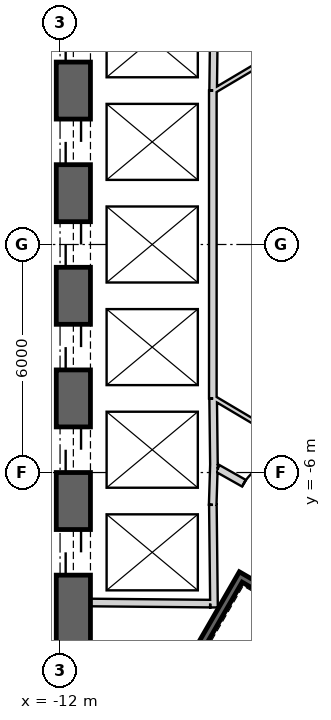
"""IFC4 building model, lengths in metres.
Left out: names, types, materials, properties, quantities, classifications, styles, units other than length and angle.
Written with IfcOpenShell. Run it as: python <this file> out.ifc"""

import sys

from ifc_helpers import new_model, si_unit, direction, frame, frame_2d, origin, place, context, subcontext, project, spatial, rectangle, extrude, element, fill, save


model = new_model("IFC4")
c1 = context("Model", 3, precision=1e-05, world=origin(), true_north=direction((0.0, 1.0)))
c2 = subcontext(c1, "Body", "Model", "MODEL_VIEW")
j1 = project(units=[si_unit("LENGTHUNIT", "METRE"), si_unit("PLANEANGLEUNIT", "RADIAN")], contexts=[c1])
p1 = place(None, origin())
s1 = spatial("IfcSite", under=j1, at=p1, CompositionType="ELEMENT")
p2 = place(p1, origin())
s2 = spatial("IfcBuilding", under=s1, at=p2, CompositionType="ELEMENT")
p3 = place(p2, frame((0.0, 0.0, 94.7)))
s3 = spatial("IfcBuildingStorey", under=s2, at=p3, CompositionType="ELEMENT", Elevation=94.7)
p4 = place(p3, frame((19.475, 2.208, 0.0), z_axis=(0.0, 0.0, 1.0), x_axis=(-0.866028369851, 0.499994862586, 0.0)))
e1 = element("IfcWall", 1, at=p4, inside=s3, PredefinedType="SHEAR", context=c2, shape_type="SweptSolid", body=[
    extrude(rectangle(XDim=31.523, YDim=0.9, at=frame_2d((15.762, 0.0))), origin(), (0.0, 0.0, 1.0), 4.1),
])
p5 = place(p4, frame((7.062, 0.0, 0.0)))
e2 = element("IfcOpeningElement", 2, at=p5, cuts=e1, PredefinedType="OPENING", context=c2, shape_type="SweptSolid", body=[
    extrude(rectangle(XDim=1.2, YDim=2.4, at=frame_2d((0.6, 1.2))), frame((0.0, 0.46, 0.0), z_axis=(0.0, -1.0, 0.0), x_axis=(1.0, 0.0, 0.0)), (0.0, 0.0, 1.0), 0.92),
])
p6 = place(p4, frame((9.762, 0.0, 0.0)))
e3 = element("IfcOpeningElement", 3, at=p6, cuts=e1, PredefinedType="OPENING", context=c2, shape_type="SweptSolid", body=[
    extrude(rectangle(XDim=1.2, YDim=2.4, at=frame_2d((0.6, 1.2))), frame((0.0, 0.46, 0.0), z_axis=(0.0, -1.0, 0.0), x_axis=(1.0, 0.0, 0.0)), (0.0, 0.0, 1.0), 0.92),
])
p7 = place(p4, frame((12.462, 0.0, 0.0)))
e4 = element("IfcOpeningElement", 4, at=p7, cuts=e1, PredefinedType="OPENING", context=c2, shape_type="SweptSolid", body=[
    extrude(rectangle(XDim=1.2, YDim=2.4, at=frame_2d((0.6, 1.2))), frame((0.0, 0.46, 0.0), z_axis=(0.0, -1.0, 0.0), x_axis=(1.0, 0.0, 0.0)), (0.0, 0.0, 1.0), 0.92),
])
p8 = place(p4, frame((15.162, 0.0, 0.0)))
e5 = element("IfcOpeningElement", 5, at=p8, cuts=e1, PredefinedType="OPENING", context=c2, shape_type="SweptSolid", body=[
    extrude(rectangle(XDim=1.2, YDim=2.4, at=frame_2d((0.6, 1.2))), frame((0.0, 0.46, 0.0), z_axis=(0.0, -1.0, 0.0), x_axis=(1.0, 0.0, 0.0)), (0.0, 0.0, 1.0), 0.92),
])
p9 = place(p4, frame((17.862, 0.0, 0.0)))
e6 = element("IfcOpeningElement", 6, at=p9, cuts=e1, PredefinedType="OPENING", context=c2, shape_type="SweptSolid", body=[
    extrude(rectangle(XDim=1.2, YDim=2.4, at=frame_2d((0.6, 1.2))), frame((0.0, 0.46, 0.0), z_axis=(0.0, -1.0, 0.0), x_axis=(1.0, 0.0, 0.0)), (0.0, 0.0, 1.0), 0.92),
])
p10 = place(p4, frame((20.562, 0.0, 0.0)))
e7 = element("IfcOpeningElement", 7, at=p10, cuts=e1, PredefinedType="OPENING", context=c2, shape_type="SweptSolid", body=[
    extrude(rectangle(XDim=1.2, YDim=2.4, at=frame_2d((0.6, 1.2))), frame((0.0, 0.46, 0.0), z_axis=(0.0, -1.0, 0.0), x_axis=(1.0, 0.0, 0.0)), (0.0, 0.0, 1.0), 0.92),
])
p11 = place(p4, frame((23.262, 0.0, 0.0)))
e8 = element("IfcOpeningElement", 8, at=p11, cuts=e1, PredefinedType="OPENING", context=c2, shape_type="SweptSolid", body=[
    extrude(rectangle(XDim=1.2, YDim=2.4, at=frame_2d((0.6, 1.2))), frame((0.0, 0.46, 0.0), z_axis=(0.0, -1.0, 0.0), x_axis=(1.0, 0.0, 0.0)), (0.0, 0.0, 1.0), 0.92),
])
p12 = place(p4, frame((3.612, 0.0, 0.0)))
e9 = element("IfcOpeningElement", 9, at=p12, cuts=e1, PredefinedType="OPENING", context=c2, shape_type="SweptSolid", body=[
    extrude(rectangle(XDim=1.2, YDim=2.4, at=frame_2d((0.6, 1.2))), frame((0.0, 0.46, 0.0), z_axis=(0.0, -1.0, 0.0), x_axis=(1.0, 0.0, 0.0)), (0.0, 0.0, 1.0), 0.92),
])
p13 = place(p4, frame((26.712, 0.0, 0.0)))
e10 = element("IfcOpeningElement", 10, at=p13, cuts=e1, PredefinedType="OPENING", context=c2, shape_type="SweptSolid", body=[
    extrude(rectangle(XDim=1.2, YDim=2.4, at=frame_2d((0.6, 1.2))), frame((0.0, 0.46, 0.0), z_axis=(0.0, -1.0, 0.0), x_axis=(1.0, 0.0, 0.0)), (0.0, 0.0, 1.0), 0.92),
])
p14 = place(p3, frame((-11.65, 15.762, 0.0), z_axis=(0.0, 0.0, 1.0), x_axis=(0.0, -1.0, 0.0)))
e11 = element("IfcWall", 11, at=p14, inside=s3, PredefinedType="SHEAR", context=c2, shape_type="SweptSolid", body=[
    extrude(rectangle(XDim=31.523, YDim=0.9, at=frame_2d((15.762, 0.0))), origin(), (0.0, 0.0, 1.0), 4.1),
])
p15 = place(p14, frame((7.062, 0.0, 0.0)))
e12 = element("IfcOpeningElement", 12, at=p15, cuts=e11, PredefinedType="OPENING", context=c2, shape_type="SweptSolid", body=[
    extrude(rectangle(XDim=1.2, YDim=2.4, at=frame_2d((0.6, 1.2))), frame((0.0, 0.46, 0.0), z_axis=(0.0, -1.0, 0.0), x_axis=(1.0, 0.0, 0.0)), (0.0, 0.0, 1.0), 0.92),
])
p16 = place(p14, frame((9.762, 0.0, 0.0)))
e13 = element("IfcOpeningElement", 13, at=p16, cuts=e11, PredefinedType="OPENING", context=c2, shape_type="SweptSolid", body=[
    extrude(rectangle(XDim=1.2, YDim=2.4, at=frame_2d((0.6, 1.2))), frame((0.0, 0.46, 0.0), z_axis=(0.0, -1.0, 0.0), x_axis=(1.0, 0.0, 0.0)), (0.0, 0.0, 1.0), 0.92),
])
p17 = place(p14, frame((12.462, 0.0, 0.0)))
e14 = element("IfcOpeningElement", 14, at=p17, cuts=e11, PredefinedType="OPENING", context=c2, shape_type="SweptSolid", body=[
    extrude(rectangle(XDim=1.2, YDim=2.4, at=frame_2d((0.6, 1.2))), frame((0.0, 0.46, 0.0), z_axis=(0.0, -1.0, 0.0), x_axis=(1.0, 0.0, 0.0)), (0.0, 0.0, 1.0), 0.92),
])
p18 = place(p14, frame((15.162, 0.0, 0.0)))
e15 = element("IfcOpeningElement", 15, at=p18, cuts=e11, PredefinedType="OPENING", context=c2, shape_type="SweptSolid", body=[
    extrude(rectangle(XDim=1.2, YDim=2.4, at=frame_2d((0.6, 1.2))), frame((0.0, 0.46, 0.0), z_axis=(0.0, -1.0, 0.0), x_axis=(1.0, 0.0, 0.0)), (0.0, 0.0, 1.0), 0.92),
])
p19 = place(p14, frame((17.862, 0.0, 0.0)))
e16 = element("IfcOpeningElement", 16, at=p19, cuts=e11, PredefinedType="OPENING", context=c2, shape_type="SweptSolid", body=[
    extrude(rectangle(XDim=1.2, YDim=2.4, at=frame_2d((0.6, 1.2))), frame((0.0, 0.46, 0.0), z_axis=(0.0, -1.0, 0.0), x_axis=(1.0, 0.0, 0.0)), (0.0, 0.0, 1.0), 0.92),
])
p20 = place(p14, frame((20.562, 0.0, 0.0)))
e17 = element("IfcOpeningElement", 17, at=p20, cuts=e11, PredefinedType="OPENING", context=c2, shape_type="SweptSolid", body=[
    extrude(rectangle(XDim=1.2, YDim=2.4, at=frame_2d((0.6, 1.2))), frame((0.0, 0.46, 0.0), z_axis=(0.0, -1.0, 0.0), x_axis=(1.0, 0.0, 0.0)), (0.0, 0.0, 1.0), 0.92),
])
p21 = place(p14, frame((23.262, 0.0, 0.0)))
e18 = element("IfcOpeningElement", 18, at=p21, cuts=e11, PredefinedType="OPENING", context=c2, shape_type="SweptSolid", body=[
    extrude(rectangle(XDim=1.2, YDim=2.4, at=frame_2d((0.6, 1.2))), frame((0.0, 0.46, 0.0), z_axis=(0.0, -1.0, 0.0), x_axis=(1.0, 0.0, 0.0)), (0.0, 0.0, 1.0), 0.92),
])
p22 = place(p14, frame((3.612, 0.0, 0.0)))
e19 = element("IfcOpeningElement", 19, at=p22, cuts=e11, PredefinedType="OPENING", context=c2, shape_type="SweptSolid", body=[
    extrude(rectangle(XDim=1.2, YDim=2.4, at=frame_2d((0.6, 1.2))), frame((0.0, 0.46, 0.0), z_axis=(0.0, -1.0, 0.0), x_axis=(1.0, 0.0, 0.0)), (0.0, 0.0, 1.0), 0.92),
])
p23 = place(p14, frame((26.712, 0.0, 0.0)))
e20 = element("IfcOpeningElement", 20, at=p23, cuts=e11, PredefinedType="OPENING", context=c2, shape_type="SweptSolid", body=[
    extrude(rectangle(XDim=1.2, YDim=2.4, at=frame_2d((0.6, 1.2))), frame((0.0, 0.46, 0.0), z_axis=(0.0, -1.0, 0.0), x_axis=(1.0, 0.0, 0.0)), (0.0, 0.0, 1.0), 0.92),
])
p24 = place(p3, frame((-7.825, -17.97, 0.0), z_axis=(0.0, 0.0, 1.0), x_axis=(0.866028369851, 0.499994862586, 0.0)))
e21 = element("IfcWall", 21, at=p24, inside=s3, PredefinedType="SHEAR", context=c2, shape_type="SweptSolid", body=[
    extrude(rectangle(XDim=31.523, YDim=0.9, at=frame_2d((15.762, 0.0))), origin(), (0.0, 0.0, 1.0), 4.1),
])
p25 = place(p24, frame((7.062, 0.0, 0.0)))
e22 = element("IfcOpeningElement", 22, at=p25, cuts=e21, PredefinedType="OPENING", context=c2, shape_type="SweptSolid", body=[
    extrude(rectangle(XDim=1.2, YDim=2.4, at=frame_2d((0.6, 1.2))), frame((0.0, 0.46, 0.0), z_axis=(0.0, -1.0, 0.0), x_axis=(1.0, 0.0, 0.0)), (0.0, 0.0, 1.0), 0.92),
])
p26 = place(p24, frame((9.762, 0.0, 0.0)))
e23 = element("IfcOpeningElement", 23, at=p26, cuts=e21, PredefinedType="OPENING", context=c2, shape_type="SweptSolid", body=[
    extrude(rectangle(XDim=1.2, YDim=2.4, at=frame_2d((0.6, 1.2))), frame((0.0, 0.46, 0.0), z_axis=(0.0, -1.0, 0.0), x_axis=(1.0, 0.0, 0.0)), (0.0, 0.0, 1.0), 0.92),
])
p27 = place(p24, frame((12.462, 0.0, 0.0)))
e24 = element("IfcOpeningElement", 24, at=p27, cuts=e21, PredefinedType="OPENING", context=c2, shape_type="SweptSolid", body=[
    extrude(rectangle(XDim=1.2, YDim=2.4, at=frame_2d((0.6, 1.2))), frame((0.0, 0.46, 0.0), z_axis=(0.0, -1.0, 0.0), x_axis=(1.0, 0.0, 0.0)), (0.0, 0.0, 1.0), 0.92),
])
p28 = place(p24, frame((15.162, 0.0, 0.0)))
e25 = element("IfcOpeningElement", 25, at=p28, cuts=e21, PredefinedType="OPENING", context=c2, shape_type="SweptSolid", body=[
    extrude(rectangle(XDim=1.2, YDim=2.4, at=frame_2d((0.6, 1.2))), frame((0.0, 0.46, 0.0), z_axis=(0.0, -1.0, 0.0), x_axis=(1.0, 0.0, 0.0)), (0.0, 0.0, 1.0), 0.92),
])
p29 = place(p24, frame((17.862, 0.0, 0.0)))
e26 = element("IfcOpeningElement", 26, at=p29, cuts=e21, PredefinedType="OPENING", context=c2, shape_type="SweptSolid", body=[
    extrude(rectangle(XDim=1.2, YDim=2.4, at=frame_2d((0.6, 1.2))), frame((0.0, 0.46, 0.0), z_axis=(0.0, -1.0, 0.0), x_axis=(1.0, 0.0, 0.0)), (0.0, 0.0, 1.0), 0.92),
])
p30 = place(p24, frame((20.562, 0.0, 0.0)))
e27 = element("IfcOpeningElement", 27, at=p30, cuts=e21, PredefinedType="OPENING", context=c2, shape_type="SweptSolid", body=[
    extrude(rectangle(XDim=1.2, YDim=2.4, at=frame_2d((0.6, 1.2))), frame((0.0, 0.46, 0.0), z_axis=(0.0, -1.0, 0.0), x_axis=(1.0, 0.0, 0.0)), (0.0, 0.0, 1.0), 0.92),
])
p31 = place(p24, frame((26.712, 0.0, 0.0)))
e28 = element("IfcOpeningElement", 28, at=p31, cuts=e21, PredefinedType="OPENING", context=c2, shape_type="SweptSolid", body=[
    extrude(rectangle(XDim=1.2, YDim=2.4, at=frame_2d((0.6, 1.2))), frame((0.0, 0.46, 0.0), z_axis=(0.0, -1.0, 0.0), x_axis=(1.0, 0.0, 0.0)), (0.0, 0.0, 1.0), 0.92),
])
p32 = place(p24, frame((3.612, 0.0, 0.0)))
e29 = element("IfcOpeningElement", 29, at=p32, cuts=e21, PredefinedType="OPENING", context=c2, shape_type="SweptSolid", body=[
    extrude(rectangle(XDim=1.2, YDim=2.4, at=frame_2d((0.6, 1.2))), frame((0.0, 0.46, 0.0), z_axis=(0.0, -1.0, 0.0), x_axis=(1.0, 0.0, 0.0)), (0.0, 0.0, 1.0), 0.92),
])
p33 = place(p3, frame((-7.949, 5.895, 0.0), z_axis=(0.0, 0.0, 1.0), x_axis=(-0.012042535896, -0.999927486035, 0.0)))
e30 = element("IfcWall", 30, at=p33, inside=s3, PredefinedType="PLUMBINGWALL", context=c2, shape_type="SweptSolid", body=[
    extrude(rectangle(XDim=1.845, YDim=0.2, at=frame_2d((0.922, 0.0))), origin(), (0.0, 0.0, 1.0), 3.8),
])
p34 = place(p3, frame((-7.98, 4.05, 0.0), z_axis=(0.0, 0.0, 1.0), x_axis=(0.0, -1.0, 0.0)))
e31 = element("IfcWall", 31, at=p34, inside=s3, PredefinedType="PLUMBINGWALL", context=c2, shape_type="SweptSolid", body=[
    extrude(rectangle(XDim=8.1, YDim=0.2, at=frame_2d((4.05, 0.0))), origin(), (0.0, 0.0, 1.0), 3.8),
])
p35 = place(p3, frame((-7.95, -5.772, 0.0), z_axis=(0.0, 0.0, 1.0), x_axis=(-0.030803413295, -0.999525462272, 0.0)))
e32 = element("IfcWall", 32, at=p35, inside=s3, PredefinedType="PLUMBINGWALL", context=c2, shape_type="SweptSolid", body=[
    extrude(rectangle(XDim=1.078, YDim=0.2, at=frame_2d((0.539, 0.0))), origin(), (0.0, 0.0, 1.0), 3.8),
])
p36 = place(p3, frame((-7.971, -4.05, 0.0), z_axis=(0.0, 0.0, 1.0), x_axis=(0.012042535896, -0.999927486035, 0.0)))
e33 = element("IfcWall", 33, at=p36, inside=s3, PredefinedType="PLUMBINGWALL", context=c2, shape_type="SweptSolid", body=[
    extrude(rectangle(XDim=1.845, YDim=0.2, at=frame_2d((0.922, 0.0))), origin(), (0.0, 0.0, 1.0), 3.8),
])
p37 = place(p3, frame((-7.979, -6.85, 0.0), z_axis=(0.0, 0.0, 1.0), x_axis=(0.011121475088, -0.999938154483, 0.0)))
e34 = element("IfcWall", 34, at=p37, inside=s3, PredefinedType="PLUMBINGWALL", context=c2, shape_type="SweptSolid", body=[
    extrude(rectangle(XDim=2.7, YDim=0.2, at=frame_2d((1.35, 0.0))), origin(), (0.0, 0.0, 1.0), 3.8),
])
p38 = place(p3, frame((-8.05, -9.449, 0.0), z_axis=(0.0, 0.0, 1.0), x_axis=(-0.999957467379, 0.009222983926, 0.0)))
e35 = element("IfcWall", 35, at=p38, inside=s3, PredefinedType="PLUMBINGWALL", context=c2, shape_type="SweptSolid", body=[
    extrude(rectangle(XDim=3.15, YDim=0.2, at=frame_2d((1.575, 0.0))), origin(), (0.0, 0.0, 1.0), 3.8),
])
p39 = place(p3, frame((-7.196, -8.663, -0.3), z_axis=(0.0, 0.0, 1.0), x_axis=(-0.499997992926, -0.866026562566, 0.0)))
e36 = element("IfcWall", 36, at=p39, inside=s3, PredefinedType="SHEAR", context=c2, shape_type="SweptSolid", body=[
    extrude(rectangle(XDim=7.9, YDim=0.2, at=frame_2d((3.95, 0.0))), origin(), (0.0, 0.0, 1.0), 4.1),
])
p40 = place(p3, frame((-4.041, -10.599, -0.3), z_axis=(0.0, 0.0, 1.0), x_axis=(-0.866047807691, 0.499961193289, 0.0)))
e37 = element("IfcWall", 37, at=p40, inside=s3, PredefinedType="SHEAR", context=c2, shape_type="SweptSolid", body=[
    extrude(rectangle(XDim=3.6, YDim=0.2, at=frame_2d((1.8, 0.0))), origin(), (0.0, 0.0, 1.0), 4.1),
])
p41 = place(p40, frame((1.25, 0.0, 0.3)))
e38 = element("IfcOpeningElement", 38, at=p41, cuts=e37, PredefinedType="OPENING", context=c2, shape_type="SweptSolid", body=[
    extrude(rectangle(XDim=1.1, YDim=2.1, at=frame_2d((0.55, 1.05))), frame((0.0, 0.11, 0.0), z_axis=(0.0, -1.0, 0.0), x_axis=(1.0, 0.0, 0.0)), (0.0, 0.0, 1.0), 0.22),
])
p42 = place(p3, frame((-7.849, -5.894, 0.0), z_axis=(0.0, 0.0, 1.0), x_axis=(0.871363259478, -0.490638431059, 0.0)))
e39 = element("IfcWall", 39, at=p42, inside=s3, PredefinedType="PARTITIONING", context=c2, shape_type="SweptSolid", body=[
    extrude(rectangle(XDim=2.581, YDim=0.2, at=frame_2d((1.291, 0.0))), origin(), (0.0, 0.0, 1.0), 3.8),
])
p43 = place(p42, frame((0.791, 0.0, 0.0)))
e40 = element("IfcOpeningElement", 40, at=p43, cuts=e39, PredefinedType="OPENING", context=c2, shape_type="SweptSolid", body=[
    extrude(rectangle(XDim=1.0, YDim=2.1, at=frame_2d((0.5, 1.05))), frame((0.0, 0.11, 0.0), z_axis=(0.0, -1.0, 0.0), x_axis=(1.0, 0.0, 0.0)), (0.0, 0.0, 1.0), 0.22),
])
p44 = place(p3, frame((-7.95, -4.041, 0.0), z_axis=(0.0, 0.0, 1.0), x_axis=(0.860112457103, -0.510104461004, 0.0)))
e41 = element("IfcWall", 41, at=p44, inside=s3, PredefinedType="PARTITIONING", context=c2, shape_type="SweptSolid", body=[
    extrude(rectangle(XDim=2.104, YDim=0.12, at=frame_2d((1.052, 0.0))), origin(), (0.0, 0.0, 1.0), 3.8),
])
p45 = place(p3, frame((-6.037, 5.176, 0.0), z_axis=(0.0, 0.0, 1.0), x_axis=(-0.860106072674, -0.510115225953, 0.0)))
e42 = element("IfcWall", 42, at=p45, inside=s3, PredefinedType="PARTITIONING", context=c2, shape_type="SweptSolid", body=[
    extrude(rectangle(XDim=2.225, YDim=0.12, at=frame_2d((1.112, 0.0))), origin(), (0.0, 0.0, 1.0), 3.8),
])
p46 = place(p43, origin())
e43 = element("IfcDoor", 43, at=p46, inside=s3, OperationType="SINGLE_SWING_LEFT", PredefinedType="USERDEFINED", context=c2, shape_type="SweptSolid", body=[
    extrude(rectangle(XDim=1.0, YDim=2.1, at=frame_2d((0.5, 1.05))), frame((0.0, 0.025, 0.0), z_axis=(0.0, -1.0, 0.0), x_axis=(1.0, 0.0, 0.0)), (0.0, 0.0, 1.0), 0.05),
])
fill(e40, e43)
p47 = place(p16, origin())
e44 = element("IfcDoor", 44, at=p47, inside=s3, OperationType="SLIDING_TO_LEFT", PredefinedType="USERDEFINED", context=c2, shape_type="SweptSolid", body=[
    extrude(rectangle(XDim=1.2, YDim=2.4, at=frame_2d((0.6, 1.2))), frame((0.0, 0.025, 0.0), z_axis=(0.0, -1.0, 0.0), x_axis=(1.0, 0.0, 0.0)), (0.0, 0.0, 1.0), 0.05),
])
fill(e13, e44)
p48 = place(p17, origin())
e45 = element("IfcDoor", 45, at=p48, inside=s3, OperationType="SLIDING_TO_LEFT", PredefinedType="USERDEFINED", context=c2, shape_type="SweptSolid", body=[
    extrude(rectangle(XDim=1.2, YDim=2.4, at=frame_2d((0.6, 1.2))), frame((0.0, 0.025, 0.0), z_axis=(0.0, -1.0, 0.0), x_axis=(1.0, 0.0, 0.0)), (0.0, 0.0, 1.0), 0.05),
])
fill(e14, e45)
p49 = place(p18, origin())
e46 = element("IfcDoor", 46, at=p49, inside=s3, OperationType="SLIDING_TO_LEFT", PredefinedType="USERDEFINED", context=c2, shape_type="SweptSolid", body=[
    extrude(rectangle(XDim=1.2, YDim=2.4, at=frame_2d((0.6, 1.2))), frame((0.0, 0.025, 0.0), z_axis=(0.0, -1.0, 0.0), x_axis=(1.0, 0.0, 0.0)), (0.0, 0.0, 1.0), 0.05),
])
fill(e15, e46)
p50 = place(p19, origin())
e47 = element("IfcDoor", 47, at=p50, inside=s3, OperationType="SLIDING_TO_LEFT", PredefinedType="USERDEFINED", context=c2, shape_type="SweptSolid", body=[
    extrude(rectangle(XDim=1.2, YDim=2.4, at=frame_2d((0.6, 1.2))), frame((0.0, 0.025, 0.0), z_axis=(0.0, -1.0, 0.0), x_axis=(1.0, 0.0, 0.0)), (0.0, 0.0, 1.0), 0.05),
])
fill(e16, e47)
p51 = place(p20, origin())
e48 = element("IfcDoor", 48, at=p51, inside=s3, OperationType="SLIDING_TO_LEFT", PredefinedType="USERDEFINED", context=c2, shape_type="SweptSolid", body=[
    extrude(rectangle(XDim=1.2, YDim=2.4, at=frame_2d((0.6, 1.2))), frame((0.0, 0.025, 0.0), z_axis=(0.0, -1.0, 0.0), x_axis=(1.0, 0.0, 0.0)), (0.0, 0.0, 1.0), 0.05),
])
fill(e17, e48)
p52 = place(p21, origin())
e49 = element("IfcDoor", 49, at=p52, inside=s3, OperationType="SLIDING_TO_LEFT", PredefinedType="USERDEFINED", context=c2, shape_type="SweptSolid", body=[
    extrude(rectangle(XDim=1.2, YDim=2.4, at=frame_2d((0.6, 1.2))), frame((0.0, 0.025, 0.0), z_axis=(0.0, -1.0, 0.0), x_axis=(1.0, 0.0, 0.0)), (0.0, 0.0, 1.0), 0.05),
])
fill(e18, e49)
save(model, sys.argv[1])
